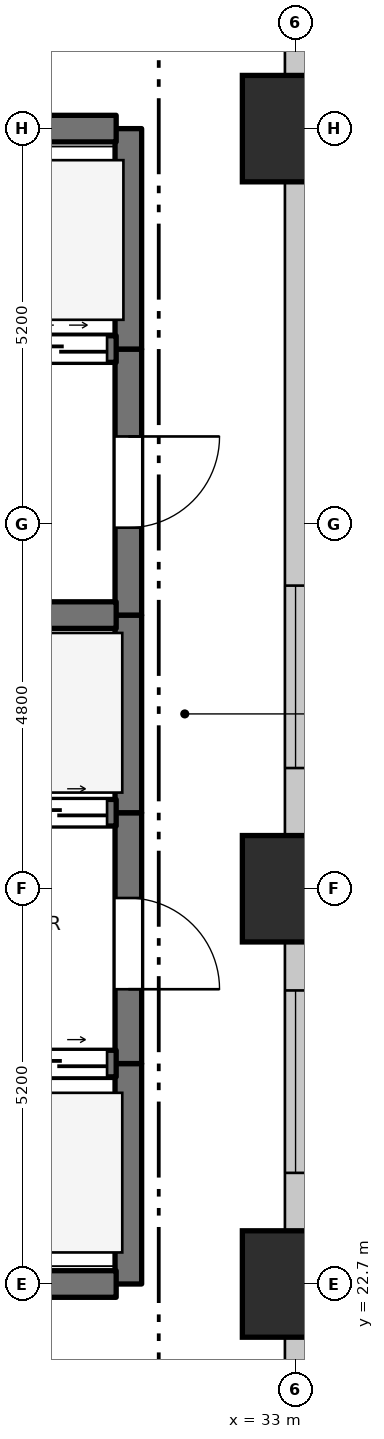
"""IFC4 building model, lengths in metres.
Left out: names, types, materials, properties, quantities, classifications, styles, units other than length and angle.
Written with IfcOpenShell. Run it as: python <this file> out.ifc"""

import sys

from ifc_helpers import new_model, si_unit, direction, frame, frame_2d, origin, origin_2d, place, context, subcontext, project, spatial, rectangle, extrude, element, fill, save


model = new_model("IFC4")
c1 = context("Model", 3, precision=1e-05, world=origin(), true_north=direction((0.0, 1.0)))
c2 = subcontext(c1, "Body", "Model", "MODEL_VIEW")
j1 = project(units=[si_unit("LENGTHUNIT", "METRE"), si_unit("PLANEANGLEUNIT", "RADIAN")], contexts=[c1])
p1 = place(None, origin())
s1 = spatial("IfcSite", under=j1, at=p1, CompositionType="ELEMENT")
p2 = place(p1, origin())
s2 = spatial("IfcBuilding", under=s1, at=p2, CompositionType="ELEMENT")
p3 = place(p2, origin())
s3 = spatial("IfcBuildingStorey", under=s2, at=p3, CompositionType="ELEMENT", Elevation=0.0)
for number, where, z_axis, x_axis in (
    (1, (33.0, 22.7, 0.0), (0.0, 0.0, 1.0), (1.0, 0.0, 0.0)),
    (2, (33.0, 27.9, 0.0), (0.0, 0.0, 1.0), (1.0, 0.0, 0.0)),
    (3, (33.0, 37.9, 0.0), (0.0, 0.0, 1.0), (1.0, 0.0, 0.0)),
):
    element("IfcColumn", number, at=place(p3, frame(where, z_axis=z_axis, x_axis=x_axis)), inside=s3, PredefinedType="PILASTER", context=c2, shape_type="SweptSolid", body=[
        extrude(rectangle(XDim=1.4, YDim=1.4, at=origin_2d()), origin(), (0.0, 0.0, 1.0), 6.5),
    ])
p4 = place(p3, frame((33.0, 54.1, 0.0), z_axis=(0.0, 0.0, 1.0), x_axis=(0.0, -1.0, 0.0)))
e4 = element("IfcWall", 4, at=p4, inside=s3, PredefinedType="STANDARD", context=c2, shape_type="SweptSolid", body=[
    extrude(rectangle(XDim=26.2, YDim=0.28, at=frame_2d((13.1, 0.0))), origin(), (0.0, 0.0, 1.0), 5.57),
])
p5 = place(p4, frame((8.7, 0.0, 0.0)))
e5 = element("IfcOpeningElement", 5, at=p5, cuts=e4, PredefinedType="OPENING", context=c2, shape_type="SweptSolid", body=[
    extrude(rectangle(XDim=1.8, YDim=2.4, at=frame_2d((0.9, 1.2))), frame((0.0, 0.15, 0.0), z_axis=(0.0, -1.0, 0.0), x_axis=(1.0, 0.0, 0.0)), (0.0, 0.0, 1.0), 0.3),
])
p6 = place(p4, frame((3.4, 0.0, 0.0)))
e6 = element("IfcOpeningElement", 6, at=p6, cuts=e4, PredefinedType="OPENING", context=c2, shape_type="SweptSolid", body=[
    extrude(rectangle(XDim=1.8, YDim=2.4, at=frame_2d((0.9, 1.2))), frame((0.0, 0.15, 0.0), z_axis=(0.0, -1.0, 0.0), x_axis=(1.0, 0.0, 0.0)), (0.0, 0.0, 1.0), 0.3),
])
p7 = place(p4, frame((22.212, 0.0, 0.9)))
e7 = element("IfcOpeningElement", 7, at=p7, cuts=e4, PredefinedType="OPENING", context=c2, shape_type="SweptSolid", body=[
    extrude(rectangle(XDim=2.4, YDim=2.4, at=frame_2d((1.2, 1.2))), frame((0.0, 0.15, 0.0), z_axis=(0.0, -1.0, 0.0), x_axis=(1.0, 0.0, 0.0)), (0.0, 0.0, 1.0), 0.3),
])
p8 = place(p3, frame((30.8, 22.7, 0.0), z_axis=(0.0, 0.0, 1.0), x_axis=(0.0, 1.0, 0.0)))
e8 = element("IfcWall", 8, at=p8, inside=s3, PredefinedType="SHEAR", context=c2, shape_type="SweptSolid", body=[
    extrude(rectangle(XDim=2.9, YDim=0.35, at=frame_2d((1.45, 0.0))), origin(), (0.0, 0.0, 1.0), 6.17),
])
p9 = place(p3, frame((30.8, 25.6, 0.0), z_axis=(0.0, 0.0, 1.0), x_axis=(0.0, 1.0, 0.0)))
e9 = element("IfcWall", 9, at=p9, inside=s3, PredefinedType="SHEAR", context=c2, shape_type="SweptSolid", body=[
    extrude(rectangle(XDim=3.3, YDim=0.35, at=frame_2d((1.65, 0.0))), origin(), (0.0, 0.0, 1.0), 6.17),
])
p10 = place(p9, frame((0.978, 0.0, 0.0)))
e10 = element("IfcOpeningElement", 10, at=p10, cuts=e9, PredefinedType="OPENING", context=c2, shape_type="SweptSolid", body=[
    extrude(rectangle(XDim=1.2, YDim=2.2, at=frame_2d((0.6, 1.1))), frame((0.0, 0.185, 0.0), z_axis=(0.0, -1.0, 0.0), x_axis=(1.0, 0.0, 0.0)), (0.0, 0.0, 1.0), 0.37),
])
p11 = place(p3, frame((30.8, 28.9, 0.0), z_axis=(0.0, 0.0, 1.0), x_axis=(0.0, 1.0, 0.0)))
e11 = element("IfcWall", 11, at=p11, inside=s3, PredefinedType="SHEAR", context=c2, shape_type="SweptSolid", body=[
    extrude(rectangle(XDim=2.6, YDim=0.35, at=frame_2d((1.3, 0.0))), origin(), (0.0, 0.0, 1.0), 6.17),
])
p12 = place(p3, frame((30.8, 31.5, 0.0), z_axis=(0.0, 0.0, 1.0), x_axis=(0.0, 1.0, 0.0)))
e12 = element("IfcWall", 12, at=p12, inside=s3, PredefinedType="SHEAR", context=c2, shape_type="SweptSolid", body=[
    extrude(rectangle(XDim=3.5, YDim=0.35, at=frame_2d((1.75, 0.0))), origin(), (0.0, 0.0, 1.0), 6.17),
])
p13 = place(p12, frame((1.15, 0.0, 0.0)))
e13 = element("IfcOpeningElement", 13, at=p13, cuts=e12, PredefinedType="OPENING", context=c2, shape_type="SweptSolid", body=[
    extrude(rectangle(XDim=1.2, YDim=2.2, at=frame_2d((0.6, 1.1))), frame((0.0, 0.185, 0.0), z_axis=(0.0, -1.0, 0.0), x_axis=(1.0, 0.0, 0.0)), (0.0, 0.0, 1.0), 0.37),
])
p14 = place(p3, frame((30.8, 35.0, 0.0), z_axis=(0.0, 0.0, 1.0), x_axis=(0.0, 1.0, 0.0)))
e14 = element("IfcWall", 14, at=p14, inside=s3, PredefinedType="SHEAR", context=c2, shape_type="SweptSolid", body=[
    extrude(rectangle(XDim=2.9, YDim=0.35, at=frame_2d((1.45, 0.0))), origin(), (0.0, 0.0, 1.0), 6.17),
])
p15 = place(p3, frame((27.46, 22.7, 0.0), z_axis=(0.0, 0.0, 1.0), x_axis=(1.0, 0.0, 0.0)))
e15 = element("IfcWall", 15, at=p15, inside=s3, PredefinedType="SHEAR", context=c2, shape_type="SweptSolid", body=[
    extrude(rectangle(XDim=3.18, YDim=0.35, at=frame_2d((1.59, 0.0))), origin(), (0.0, 0.0, 1.0), 6.17),
])
p16 = place(p3, frame((27.46, 25.6, 0.0), z_axis=(0.0, 0.0, 1.0), x_axis=(1.0, 0.0, 0.0)))
e16 = element("IfcWall", 16, at=p16, inside=s3, PredefinedType="SHEAR", context=c2, shape_type="SweptSolid", body=[
    extrude(rectangle(XDim=3.18, YDim=0.35, at=frame_2d((1.59, 0.0))), origin(), (0.0, 0.0, 1.0), 6.17),
])
p17 = place(p16, frame((0.12, 0.0, 0.0)))
e17 = element("IfcOpeningElement", 17, at=p17, cuts=e16, PredefinedType="OPENING", context=c2, shape_type="SweptSolid", body=[
    extrude(rectangle(XDim=1.25, YDim=2.2, at=frame_2d((0.625, 1.1))), frame((0.0, 0.185, 0.0), z_axis=(0.0, -1.0, 0.0), x_axis=(1.0, 0.0, 0.0)), (0.0, 0.0, 1.0), 0.37),
])
p18 = place(p16, frame((1.81, 0.0, 0.0)))
e18 = element("IfcOpeningElement", 18, at=p18, cuts=e16, PredefinedType="OPENING", context=c2, shape_type="SweptSolid", body=[
    extrude(rectangle(XDim=1.25, YDim=2.2, at=frame_2d((0.625, 1.1))), frame((0.0, 0.185, 0.0), z_axis=(0.0, -1.0, 0.0), x_axis=(1.0, 0.0, 0.0)), (0.0, 0.0, 1.0), 0.37),
])
p19 = place(p3, frame((27.46, 28.9, 0.0), z_axis=(0.0, 0.0, 1.0), x_axis=(1.0, 0.0, 0.0)))
e19 = element("IfcWall", 19, at=p19, inside=s3, PredefinedType="SHEAR", context=c2, shape_type="SweptSolid", body=[
    extrude(rectangle(XDim=3.18, YDim=0.35, at=frame_2d((1.59, 0.0))), origin(), (0.0, 0.0, 1.0), 6.17),
])
p20 = place(p19, frame((0.12, 0.0, 0.0)))
e20 = element("IfcOpeningElement", 20, at=p20, cuts=e19, PredefinedType="OPENING", context=c2, shape_type="SweptSolid", body=[
    extrude(rectangle(XDim=1.25, YDim=2.2, at=frame_2d((0.625, 1.1))), frame((0.0, 0.185, 0.0), z_axis=(0.0, -1.0, 0.0), x_axis=(1.0, 0.0, 0.0)), (0.0, 0.0, 1.0), 0.37),
])
p21 = place(p19, frame((1.81, 0.0, 0.0)))
e21 = element("IfcOpeningElement", 21, at=p21, cuts=e19, PredefinedType="OPENING", context=c2, shape_type="SweptSolid", body=[
    extrude(rectangle(XDim=1.25, YDim=2.2, at=frame_2d((0.625, 1.1))), frame((0.0, 0.185, 0.0), z_axis=(0.0, -1.0, 0.0), x_axis=(1.0, 0.0, 0.0)), (0.0, 0.0, 1.0), 0.37),
])
p22 = place(p3, frame((27.46, 31.5, 0.0), z_axis=(0.0, 0.0, 1.0), x_axis=(1.0, 0.0, 0.0)))
e22 = element("IfcWall", 22, at=p22, inside=s3, PredefinedType="SHEAR", context=c2, shape_type="SweptSolid", body=[
    extrude(rectangle(XDim=3.18, YDim=0.35, at=frame_2d((1.59, 0.0))), origin(), (0.0, 0.0, 1.0), 6.17),
])
p23 = place(p3, frame((19.16, 35.0, 0.0), z_axis=(0.0, 0.0, 1.0), x_axis=(1.0, 0.0, 0.0)))
e23 = element("IfcWall", 23, at=p23, inside=s3, PredefinedType="SHEAR", context=c2, shape_type="SweptSolid", body=[
    extrude(rectangle(XDim=11.48, YDim=0.35, at=frame_2d((5.74, 0.0))), origin(), (0.0, 0.0, 1.0), 6.17),
])
p24 = place(p23, frame((0.365, 0.0, 0.0)))
e24 = element("IfcOpeningElement", 24, at=p24, cuts=e23, PredefinedType="OPENING", context=c2, shape_type="SweptSolid", body=[
    extrude(rectangle(XDim=1.35, YDim=2.2, at=frame_2d((0.675, 1.1))), frame((0.0, 0.185, 0.0), z_axis=(0.0, -1.0, 0.0), x_axis=(1.0, 0.0, 0.0)), (0.0, 0.0, 1.0), 0.37),
])
p25 = place(p23, frame((2.765, 0.0, 0.0)))
e25 = element("IfcOpeningElement", 25, at=p25, cuts=e23, PredefinedType="OPENING", context=c2, shape_type="SweptSolid", body=[
    extrude(rectangle(XDim=1.35, YDim=2.2, at=frame_2d((0.675, 1.1))), frame((0.0, 0.185, 0.0), z_axis=(0.0, -1.0, 0.0), x_axis=(1.0, 0.0, 0.0)), (0.0, 0.0, 1.0), 0.37),
])
p26 = place(p23, frame((4.915, 0.0, 0.0)))
e26 = element("IfcOpeningElement", 26, at=p26, cuts=e23, PredefinedType="OPENING", context=c2, shape_type="SweptSolid", body=[
    extrude(rectangle(XDim=1.2, YDim=2.2, at=frame_2d((0.6, 1.1))), frame((0.0, 0.185, 0.0), z_axis=(0.0, -1.0, 0.0), x_axis=(1.0, 0.0, 0.0)), (0.0, 0.0, 1.0), 0.37),
])
p27 = place(p23, frame((6.665, 0.0, 0.0)))
e27 = element("IfcOpeningElement", 27, at=p27, cuts=e23, PredefinedType="OPENING", context=c2, shape_type="SweptSolid", body=[
    extrude(rectangle(XDim=1.2, YDim=2.2, at=frame_2d((0.6, 1.1))), frame((0.0, 0.185, 0.0), z_axis=(0.0, -1.0, 0.0), x_axis=(1.0, 0.0, 0.0)), (0.0, 0.0, 1.0), 0.37),
])
p28 = place(p23, frame((8.415, 0.0, 0.0)))
e28 = element("IfcOpeningElement", 28, at=p28, cuts=e23, PredefinedType="OPENING", context=c2, shape_type="SweptSolid", body=[
    extrude(rectangle(XDim=1.2, YDim=2.2, at=frame_2d((0.6, 1.1))), frame((0.0, 0.185, 0.0), z_axis=(0.0, -1.0, 0.0), x_axis=(1.0, 0.0, 0.0)), (0.0, 0.0, 1.0), 0.37),
])
p29 = place(p23, frame((10.16, 0.0, 0.0)))
e29 = element("IfcOpeningElement", 29, at=p29, cuts=e23, PredefinedType="OPENING", context=c2, shape_type="SweptSolid", body=[
    extrude(rectangle(XDim=1.2, YDim=2.2, at=frame_2d((0.6, 1.1))), frame((0.0, 0.185, 0.0), z_axis=(0.0, -1.0, 0.0), x_axis=(1.0, 0.0, 0.0)), (0.0, 0.0, 1.0), 0.37),
])
p30 = place(p3, frame((19.16, 37.9, 0.0), z_axis=(0.0, 0.0, 1.0), x_axis=(1.0, 0.0, 0.0)))
e30 = element("IfcWall", 30, at=p30, inside=s3, PredefinedType="SHEAR", context=c2, shape_type="SweptSolid", body=[
    extrude(rectangle(XDim=11.48, YDim=0.35, at=frame_2d((5.74, 0.0))), origin(), (0.0, 0.0, 1.0), 6.17),
])
p31 = place(p3, frame((33.0, 27.9, 0.0), z_axis=(0.0, 0.0, 1.0), x_axis=(0.0, -1.0, 0.0)))
e31 = element("IfcWall", 31, at=p31, inside=s3, PredefinedType="STANDARD", context=c2, shape_type="SweptSolid", body=[
    extrude(rectangle(XDim=27.2, YDim=0.28, at=frame_2d((13.6, 0.0))), origin(), (0.0, 0.0, 1.0), 5.67),
])
p32 = place(p31, frame((17.3, 0.0, 0.0)))
e32 = element("IfcOpeningElement", 32, at=p32, cuts=e31, PredefinedType="OPENING", context=c2, shape_type="SweptSolid", body=[
    extrude(rectangle(XDim=1.8, YDim=2.4, at=frame_2d((0.9, 1.2))), frame((0.0, 0.15, 0.0), z_axis=(0.0, -1.0, 0.0), x_axis=(1.0, 0.0, 0.0)), (0.0, 0.0, 1.0), 0.3),
])
p33 = place(p31, frame((6.4, 0.0, 0.0)))
e33 = element("IfcOpeningElement", 33, at=p33, cuts=e31, PredefinedType="OPENING", context=c2, shape_type="SweptSolid", body=[
    extrude(rectangle(XDim=1.8, YDim=2.4, at=frame_2d((0.9, 1.2))), frame((0.0, 0.15, 0.0), z_axis=(0.0, -1.0, 0.0), x_axis=(1.0, 0.0, 0.0)), (0.0, 0.0, 1.0), 0.3),
])
p34 = place(p31, frame((1.338, 0.0, 0.9)))
e34 = element("IfcOpeningElement", 34, at=p34, cuts=e31, PredefinedType="OPENING", context=c2, shape_type="SweptSolid", body=[
    extrude(rectangle(XDim=2.4, YDim=2.4, at=frame_2d((1.2, 1.2))), frame((0.0, 0.15, 0.0), z_axis=(0.0, -1.0, 0.0), x_axis=(1.0, 0.0, 0.0)), (0.0, 0.0, 1.0), 0.3),
])
p35 = place(p31, frame((22.762, 0.0, 0.9)))
e35 = element("IfcOpeningElement", 35, at=p35, cuts=e31, PredefinedType="OPENING", context=c2, shape_type="SweptSolid", body=[
    extrude(rectangle(XDim=2.4, YDim=2.4, at=frame_2d((1.2, 1.2))), frame((0.0, 0.15, 0.0), z_axis=(0.0, -1.0, 0.0), x_axis=(1.0, 0.0, 0.0)), (0.0, 0.0, 1.0), 0.3),
])
p36 = place(p7, origin())
e36 = element("IfcWindow", 36, at=p36, inside=s3, PartitioningType="DOUBLE_PANEL_VERTICAL", PredefinedType="WINDOW", context=c2, shape_type="SweptSolid", body=[
    extrude(rectangle(XDim=2.4, YDim=2.4, at=frame_2d((1.2, 1.2))), frame((0.0, 0.03, 0.0), z_axis=(0.0, -1.0, 0.0), x_axis=(1.0, 0.0, 0.0)), (0.0, 0.0, 1.0), 0.06),
])
fill(e7, e36)
p37 = place(p34, origin())
e37 = element("IfcWindow", 37, at=p37, inside=s3, PartitioningType="DOUBLE_PANEL_VERTICAL", PredefinedType="WINDOW", context=c2, shape_type="SweptSolid", body=[
    extrude(rectangle(XDim=2.4, YDim=2.4, at=frame_2d((1.2, 1.2))), frame((0.0, 0.03, 0.0), z_axis=(0.0, -1.0, 0.0), x_axis=(1.0, 0.0, 0.0)), (0.0, 0.0, 1.0), 0.06),
])
fill(e34, e37)
p38 = place(p10, frame((1.2, 0.0, 0.0), z_axis=(0.0, 0.0, 1.0), x_axis=(-1.0, 0.0, 0.0)))
e38 = element("IfcDoor", 38, at=p38, inside=s3, OperationType="SINGLE_SWING_LEFT", PredefinedType="DOOR", context=c2, shape_type="SweptSolid", body=[
    extrude(rectangle(XDim=1.2, YDim=2.2, at=frame_2d((0.6, 1.1))), frame((0.0, 0.025, 0.0), z_axis=(0.0, -1.0, 0.0), x_axis=(1.0, 0.0, 0.0)), (0.0, 0.0, 1.0), 0.05),
])
fill(e10, e38)
p39 = place(p13, frame((1.2, 0.0, 0.0), z_axis=(0.0, 0.0, 1.0), x_axis=(-1.0, 0.0, 0.0)))
e39 = element("IfcDoor", 39, at=p39, inside=s3, OperationType="SINGLE_SWING_RIGHT", PredefinedType="DOOR", context=c2, shape_type="SweptSolid", body=[
    extrude(rectangle(XDim=1.2, YDim=2.2, at=frame_2d((0.6, 1.1))), frame((0.0, 0.025, 0.0), z_axis=(0.0, -1.0, 0.0), x_axis=(1.0, 0.0, 0.0)), (0.0, 0.0, 1.0), 0.05),
])
fill(e13, e39)
p40 = place(p18, origin())
e40 = element("IfcDoor", 40, at=p40, inside=s3, OperationType="DOUBLE_DOOR_SLIDING", PredefinedType="DOOR", context=c2, shape_type="SweptSolid", body=[
    extrude(rectangle(XDim=1.25, YDim=2.2, at=frame_2d((0.625, 1.1))), frame((0.0, 0.025, 0.0), z_axis=(0.0, -1.0, 0.0), x_axis=(1.0, 0.0, 0.0)), (0.0, 0.0, 1.0), 0.05),
])
fill(e18, e40)
p41 = place(p21, origin())
e41 = element("IfcDoor", 41, at=p41, inside=s3, OperationType="DOUBLE_DOOR_SLIDING", PredefinedType="DOOR", context=c2, shape_type="SweptSolid", body=[
    extrude(rectangle(XDim=1.25, YDim=2.2, at=frame_2d((0.625, 1.1))), frame((0.0, 0.025, 0.0), z_axis=(0.0, -1.0, 0.0), x_axis=(1.0, 0.0, 0.0)), (0.0, 0.0, 1.0), 0.05),
])
fill(e21, e41)
p42 = place(p29, origin())
e42 = element("IfcDoor", 42, at=p42, inside=s3, OperationType="DOUBLE_DOOR_SLIDING", PredefinedType="DOOR", context=c2, shape_type="SweptSolid", body=[
    extrude(rectangle(XDim=1.2, YDim=2.2, at=frame_2d((0.6, 1.1))), frame((0.0, 0.025, 0.0), z_axis=(0.0, -1.0, 0.0), x_axis=(1.0, 0.0, 0.0)), (0.0, 0.0, 1.0), 0.05),
])
fill(e29, e42)
save(model, sys.argv[1])
